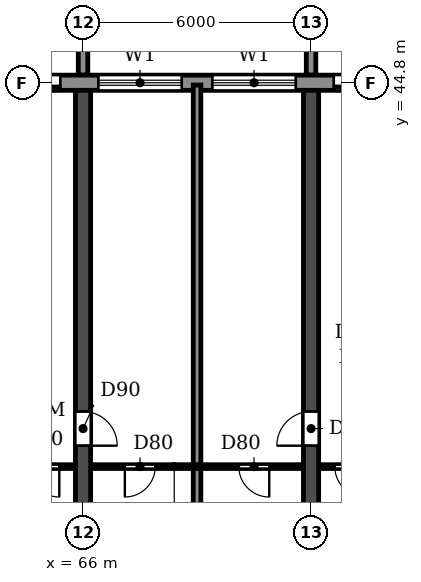
"""IFC4 building model, lengths in metres.
Left out: names, types, materials, properties, quantities, classifications, styles, units other than length and angle.
Written with IfcOpenShell. Run it as: python <this file> out.ifc"""

import sys

from ifc_helpers import new_model, si_unit, direction, frame, frame_2d, origin, place, context, subcontext, project, spatial, polyline, rectangle, outline, extrude, source, transform, mapped, element, fill, save


model = new_model("IFC4")
c1 = context("Model", 3, precision=1e-05, world=origin(), true_north=direction((0.0, 1.0)))
c2 = subcontext(c1, "Body", "Model", "MODEL_VIEW")
j1 = project(units=[si_unit("LENGTHUNIT", "METRE"), si_unit("PLANEANGLEUNIT", "RADIAN")], contexts=[c1])
p1 = place(None, origin())
s1 = spatial("IfcSite", under=j1, at=p1, CompositionType="ELEMENT")
p2 = place(p1, origin())
s2 = spatial("IfcBuilding", under=s1, at=p2, CompositionType="ELEMENT")
p3 = place(p2, frame((0.0, 0.0, 33.3)))
s3 = spatial("IfcBuildingStorey", under=s2, at=p3, CompositionType="ELEMENT", Elevation=33.3)
p4 = place(p3, frame((66.0, 30.55, 0.0), z_axis=(0.0, 0.0, 1.0), x_axis=(0.0, 1.0, 0.0)))
e1 = element("IfcWall", 1, at=p4, inside=s3, PredefinedType="SHEAR", context=c2, shape_type="SweptSolid", body=[
    extrude(rectangle(XDim=14.05, YDim=0.4, at=frame_2d((7.025, 0.0))), origin(), (0.0, 0.0, 1.0), 3.05),
])
p5 = place(p4, frame((4.7, 0.0, 0.0)))
e2 = element("IfcOpeningElement", 2, at=p5, cuts=e1, PredefinedType="OPENING", context=c2, shape_type="SweptSolid", body=[
    extrude(rectangle(XDim=0.9, YDim=2.1, at=frame_2d((0.45, 1.05))), frame((0.0, 0.21, 0.0), z_axis=(0.0, -1.0, 0.0), x_axis=(1.0, 0.0, 0.0)), (0.0, 0.0, 1.0), 0.42),
])
p6 = place(p3, frame((72.0, 30.55, 0.0), z_axis=(0.0, 0.0, 1.0), x_axis=(0.0, 1.0, 0.0)))
e3 = element("IfcWall", 3, at=p6, inside=s3, PredefinedType="SHEAR", context=c2, shape_type="SweptSolid", body=[
    extrude(rectangle(XDim=14.05, YDim=0.4, at=frame_2d((7.025, 0.0))), origin(), (0.0, 0.0, 1.0), 3.05),
])
p7 = place(p6, frame((4.7, 0.0, 0.0)))
e4 = element("IfcOpeningElement", 4, at=p7, cuts=e3, PredefinedType="OPENING", context=c2, shape_type="SweptSolid", body=[
    extrude(rectangle(XDim=0.9, YDim=2.1, at=frame_2d((0.45, 1.05))), frame((0.0, 0.21, 0.0), z_axis=(0.0, -1.0, 0.0), x_axis=(1.0, 0.0, 0.0)), (0.0, 0.0, 1.0), 0.42),
])
p8 = place(p3, frame((97.317, 44.8, 0.0), z_axis=(0.0, 0.0, 1.0), x_axis=(-1.0, 0.0, 0.0)))
e5 = element("IfcWall", 5, at=p8, inside=s3, PredefinedType="STANDARD", context=c2, shape_type="SweptSolid", body=[
    extrude(rectangle(XDim=92.634, YDim=0.4, at=frame_2d((46.317, 0.0))), origin(), (0.0, 0.0, 1.0), 3.05),
])
p9 = place(p8, frame((88.717, 0.0, 0.9)))
e6 = element("IfcOpeningElement", 6, at=p9, cuts=e5, PredefinedType="OPENING", context=c2, shape_type="SweptSolid", body=[
    extrude(rectangle(XDim=2.2, YDim=1.5, at=frame_2d((1.1, 0.75))), frame((0.0, 0.21, 0.0), z_axis=(0.0, -1.0, 0.0), x_axis=(1.0, 0.0, 0.0)), (0.0, 0.0, 1.0), 0.42),
])
p10 = place(p8, frame((85.917, 0.0, 0.0)))
e7 = element("IfcOpeningElement", 7, at=p10, cuts=e5, PredefinedType="OPENING", context=c2, shape_type="SweptSolid", body=[
    extrude(rectangle(XDim=1.8, YDim=2.4, at=frame_2d((0.9, 1.2))), frame((0.0, 0.21, 0.0), z_axis=(0.0, -1.0, 0.0), x_axis=(1.0, 0.0, 0.0)), (0.0, 0.0, 1.0), 0.42),
])
p11 = place(p8, frame((82.717, 0.0, 0.9)))
e8 = element("IfcOpeningElement", 8, at=p11, cuts=e5, PredefinedType="OPENING", context=c2, shape_type="SweptSolid", body=[
    extrude(rectangle(XDim=2.2, YDim=1.5, at=frame_2d((1.1, 0.75))), frame((0.0, 0.21, 0.0), z_axis=(0.0, -1.0, 0.0), x_axis=(1.0, 0.0, 0.0)), (0.0, 0.0, 1.0), 0.42),
])
p12 = place(p8, frame((79.917, 0.0, 0.0)))
e9 = element("IfcOpeningElement", 9, at=p12, cuts=e5, PredefinedType="OPENING", context=c2, shape_type="SweptSolid", body=[
    extrude(rectangle(XDim=1.8, YDim=2.4, at=frame_2d((0.9, 1.2))), frame((0.0, 0.21, 0.0), z_axis=(0.0, -1.0, 0.0), x_axis=(1.0, 0.0, 0.0)), (0.0, 0.0, 1.0), 0.42),
])
p13 = place(p8, frame((76.717, 0.0, 0.9)))
e10 = element("IfcOpeningElement", 10, at=p13, cuts=e5, PredefinedType="OPENING", context=c2, shape_type="SweptSolid", body=[
    extrude(rectangle(XDim=2.2, YDim=1.5, at=frame_2d((1.1, 0.75))), frame((0.0, 0.21, 0.0), z_axis=(0.0, -1.0, 0.0), x_axis=(1.0, 0.0, 0.0)), (0.0, 0.0, 1.0), 0.42),
])
p14 = place(p8, frame((73.717, 0.0, 0.9)))
e11 = element("IfcOpeningElement", 11, at=p14, cuts=e5, PredefinedType="OPENING", context=c2, shape_type="SweptSolid", body=[
    extrude(rectangle(XDim=2.2, YDim=1.5, at=frame_2d((1.1, 0.75))), frame((0.0, 0.21, 0.0), z_axis=(0.0, -1.0, 0.0), x_axis=(1.0, 0.0, 0.0)), (0.0, 0.0, 1.0), 0.42),
])
p15 = place(p8, frame((70.717, 0.0, 0.9)))
e12 = element("IfcOpeningElement", 12, at=p15, cuts=e5, PredefinedType="OPENING", context=c2, shape_type="SweptSolid", body=[
    extrude(rectangle(XDim=2.2, YDim=1.5, at=frame_2d((1.1, 0.75))), frame((0.0, 0.21, 0.0), z_axis=(0.0, -1.0, 0.0), x_axis=(1.0, 0.0, 0.0)), (0.0, 0.0, 1.0), 0.42),
])
p16 = place(p8, frame((67.917, 0.0, 0.0)))
e13 = element("IfcOpeningElement", 13, at=p16, cuts=e5, PredefinedType="OPENING", context=c2, shape_type="SweptSolid", body=[
    extrude(rectangle(XDim=1.8, YDim=2.4, at=frame_2d((0.9, 1.2))), frame((0.0, 0.21, 0.0), z_axis=(0.0, -1.0, 0.0), x_axis=(1.0, 0.0, 0.0)), (0.0, 0.0, 1.0), 0.42),
])
p17 = place(p8, frame((64.717, 0.0, 0.9)))
e14 = element("IfcOpeningElement", 14, at=p17, cuts=e5, PredefinedType="OPENING", context=c2, shape_type="SweptSolid", body=[
    extrude(rectangle(XDim=2.2, YDim=1.5, at=frame_2d((1.1, 0.75))), frame((0.0, 0.21, 0.0), z_axis=(0.0, -1.0, 0.0), x_axis=(1.0, 0.0, 0.0)), (0.0, 0.0, 1.0), 0.42),
])
p18 = place(p8, frame((61.717, 0.0, 0.9)))
e15 = element("IfcOpeningElement", 15, at=p18, cuts=e5, PredefinedType="OPENING", context=c2, shape_type="SweptSolid", body=[
    extrude(rectangle(XDim=2.2, YDim=1.5, at=frame_2d((1.1, 0.75))), frame((0.0, 0.21, 0.0), z_axis=(0.0, -1.0, 0.0), x_axis=(1.0, 0.0, 0.0)), (0.0, 0.0, 1.0), 0.42),
])
p19 = place(p8, frame((58.717, 0.0, 0.9)))
e16 = element("IfcOpeningElement", 16, at=p19, cuts=e5, PredefinedType="OPENING", context=c2, shape_type="SweptSolid", body=[
    extrude(rectangle(XDim=2.2, YDim=1.5, at=frame_2d((1.1, 0.75))), frame((0.0, 0.21, 0.0), z_axis=(0.0, -1.0, 0.0), x_axis=(1.0, 0.0, 0.0)), (0.0, 0.0, 1.0), 0.42),
])
p20 = place(p8, frame((55.917, 0.0, 0.0)))
e17 = element("IfcOpeningElement", 17, at=p20, cuts=e5, PredefinedType="OPENING", context=c2, shape_type="SweptSolid", body=[
    extrude(rectangle(XDim=1.8, YDim=2.4, at=frame_2d((0.9, 1.2))), frame((0.0, 0.21, 0.0), z_axis=(0.0, -1.0, 0.0), x_axis=(1.0, 0.0, 0.0)), (0.0, 0.0, 1.0), 0.42),
])
p21 = place(p8, frame((52.717, 0.0, 0.9)))
e18 = element("IfcOpeningElement", 18, at=p21, cuts=e5, PredefinedType="OPENING", context=c2, shape_type="SweptSolid", body=[
    extrude(rectangle(XDim=2.2, YDim=1.5, at=frame_2d((1.1, 0.75))), frame((0.0, 0.21, 0.0), z_axis=(0.0, -1.0, 0.0), x_axis=(1.0, 0.0, 0.0)), (0.0, 0.0, 1.0), 0.42),
])
p22 = place(p8, frame((49.717, 0.0, 0.9)))
e19 = element("IfcOpeningElement", 19, at=p22, cuts=e5, PredefinedType="OPENING", context=c2, shape_type="SweptSolid", body=[
    extrude(rectangle(XDim=2.2, YDim=1.5, at=frame_2d((1.1, 0.75))), frame((0.0, 0.21, 0.0), z_axis=(0.0, -1.0, 0.0), x_axis=(1.0, 0.0, 0.0)), (0.0, 0.0, 1.0), 0.42),
])
p23 = place(p8, frame((46.717, 0.0, 0.9)))
e20 = element("IfcOpeningElement", 20, at=p23, cuts=e5, PredefinedType="OPENING", context=c2, shape_type="SweptSolid", body=[
    extrude(rectangle(XDim=2.2, YDim=1.5, at=frame_2d((1.1, 0.75))), frame((0.0, 0.21, 0.0), z_axis=(0.0, -1.0, 0.0), x_axis=(1.0, 0.0, 0.0)), (0.0, 0.0, 1.0), 0.42),
])
p24 = place(p8, frame((43.917, 0.0, 0.0)))
e21 = element("IfcOpeningElement", 21, at=p24, cuts=e5, PredefinedType="OPENING", context=c2, shape_type="SweptSolid", body=[
    extrude(rectangle(XDim=1.8, YDim=2.4, at=frame_2d((0.9, 1.2))), frame((0.0, 0.21, 0.0), z_axis=(0.0, -1.0, 0.0), x_axis=(1.0, 0.0, 0.0)), (0.0, 0.0, 1.0), 0.42),
])
p25 = place(p8, frame((40.717, 0.0, 0.9)))
e22 = element("IfcOpeningElement", 22, at=p25, cuts=e5, PredefinedType="OPENING", context=c2, shape_type="SweptSolid", body=[
    extrude(rectangle(XDim=2.2, YDim=1.5, at=frame_2d((1.1, 0.75))), frame((0.0, 0.21, 0.0), z_axis=(0.0, -1.0, 0.0), x_axis=(1.0, 0.0, 0.0)), (0.0, 0.0, 1.0), 0.42),
])
p26 = place(p8, frame((37.717, 0.0, 0.9)))
e23 = element("IfcOpeningElement", 23, at=p26, cuts=e5, PredefinedType="OPENING", context=c2, shape_type="SweptSolid", body=[
    extrude(rectangle(XDim=2.2, YDim=1.5, at=frame_2d((1.1, 0.75))), frame((0.0, 0.21, 0.0), z_axis=(0.0, -1.0, 0.0), x_axis=(1.0, 0.0, 0.0)), (0.0, 0.0, 1.0), 0.42),
])
p27 = place(p8, frame((34.717, 0.0, 0.9)))
e24 = element("IfcOpeningElement", 24, at=p27, cuts=e5, PredefinedType="OPENING", context=c2, shape_type="SweptSolid", body=[
    extrude(rectangle(XDim=2.2, YDim=1.5, at=frame_2d((1.1, 0.75))), frame((0.0, 0.21, 0.0), z_axis=(0.0, -1.0, 0.0), x_axis=(1.0, 0.0, 0.0)), (0.0, 0.0, 1.0), 0.42),
])
p28 = place(p8, frame((31.917, 0.0, 0.0)))
e25 = element("IfcOpeningElement", 25, at=p28, cuts=e5, PredefinedType="OPENING", context=c2, shape_type="SweptSolid", body=[
    extrude(rectangle(XDim=1.8, YDim=2.4, at=frame_2d((0.9, 1.2))), frame((0.0, 0.21, 0.0), z_axis=(0.0, -1.0, 0.0), x_axis=(1.0, 0.0, 0.0)), (0.0, 0.0, 1.0), 0.42),
])
p29 = place(p8, frame((28.717, 0.0, 0.9)))
e26 = element("IfcOpeningElement", 26, at=p29, cuts=e5, PredefinedType="OPENING", context=c2, shape_type="SweptSolid", body=[
    extrude(rectangle(XDim=2.2, YDim=1.5, at=frame_2d((1.1, 0.75))), frame((0.0, 0.21, 0.0), z_axis=(0.0, -1.0, 0.0), x_axis=(1.0, 0.0, 0.0)), (0.0, 0.0, 1.0), 0.42),
])
p30 = place(p8, frame((25.717, 0.0, 0.9)))
e27 = element("IfcOpeningElement", 27, at=p30, cuts=e5, PredefinedType="OPENING", context=c2, shape_type="SweptSolid", body=[
    extrude(rectangle(XDim=2.2, YDim=1.5, at=frame_2d((1.1, 0.75))), frame((0.0, 0.21, 0.0), z_axis=(0.0, -1.0, 0.0), x_axis=(1.0, 0.0, 0.0)), (0.0, 0.0, 1.0), 0.42),
])
p31 = place(p8, frame((22.917, 0.0, 0.0)))
e28 = element("IfcOpeningElement", 28, at=p31, cuts=e5, PredefinedType="OPENING", context=c2, shape_type="SweptSolid", body=[
    extrude(rectangle(XDim=1.8, YDim=2.4, at=frame_2d((0.9, 1.2))), frame((0.0, 0.21, 0.0), z_axis=(0.0, -1.0, 0.0), x_axis=(1.0, 0.0, 0.0)), (0.0, 0.0, 1.0), 0.42),
])
p32 = place(p8, frame((19.717, 0.0, 0.9)))
e29 = element("IfcOpeningElement", 29, at=p32, cuts=e5, PredefinedType="OPENING", context=c2, shape_type="SweptSolid", body=[
    extrude(rectangle(XDim=2.2, YDim=1.5, at=frame_2d((1.1, 0.75))), frame((0.0, 0.21, 0.0), z_axis=(0.0, -1.0, 0.0), x_axis=(1.0, 0.0, 0.0)), (0.0, 0.0, 1.0), 0.42),
])
p33 = place(p8, frame((16.717, 0.0, 0.9)))
e30 = element("IfcOpeningElement", 30, at=p33, cuts=e5, PredefinedType="OPENING", context=c2, shape_type="SweptSolid", body=[
    extrude(rectangle(XDim=2.2, YDim=1.5, at=frame_2d((1.1, 0.75))), frame((0.0, 0.21, 0.0), z_axis=(0.0, -1.0, 0.0), x_axis=(1.0, 0.0, 0.0)), (0.0, 0.0, 1.0), 0.42),
])
p34 = place(p8, frame((13.917, 0.0, 0.0)))
e31 = element("IfcOpeningElement", 31, at=p34, cuts=e5, PredefinedType="OPENING", context=c2, shape_type="SweptSolid", body=[
    extrude(rectangle(XDim=1.8, YDim=2.4, at=frame_2d((0.9, 1.2))), frame((0.0, 0.21, 0.0), z_axis=(0.0, -1.0, 0.0), x_axis=(1.0, 0.0, 0.0)), (0.0, 0.0, 1.0), 0.42),
])
p35 = place(p8, frame((10.717, 0.0, 0.9)))
e32 = element("IfcOpeningElement", 32, at=p35, cuts=e5, PredefinedType="OPENING", context=c2, shape_type="SweptSolid", body=[
    extrude(rectangle(XDim=2.2, YDim=1.5, at=frame_2d((1.1, 0.75))), frame((0.0, 0.21, 0.0), z_axis=(0.0, -1.0, 0.0), x_axis=(1.0, 0.0, 0.0)), (0.0, 0.0, 1.0), 0.42),
])
p36 = place(p8, frame((7.917, 0.0, 0.0)))
e33 = element("IfcOpeningElement", 33, at=p36, cuts=e5, PredefinedType="OPENING", context=c2, shape_type="SweptSolid", body=[
    extrude(rectangle(XDim=1.8, YDim=2.4, at=frame_2d((0.9, 1.2))), frame((0.0, 0.21, 0.0), z_axis=(0.0, -1.0, 0.0), x_axis=(1.0, 0.0, 0.0)), (0.0, 0.0, 1.0), 0.42),
])
p37 = place(p8, frame((4.717, 0.0, 0.9)))
e34 = element("IfcOpeningElement", 34, at=p37, cuts=e5, PredefinedType="OPENING", context=c2, shape_type="SweptSolid", body=[
    extrude(rectangle(XDim=2.2, YDim=1.5, at=frame_2d((1.1, 0.75))), frame((0.0, 0.21, 0.0), z_axis=(0.0, -1.0, 0.0), x_axis=(1.0, 0.0, 0.0)), (0.0, 0.0, 1.0), 0.42),
])
p38 = place(p8, frame((1.917, 0.0, 0.0)))
e35 = element("IfcOpeningElement", 35, at=p38, cuts=e5, PredefinedType="OPENING", context=c2, shape_type="SweptSolid", body=[
    extrude(rectangle(XDim=1.8, YDim=2.4, at=frame_2d((0.9, 1.2))), frame((0.0, 0.21, 0.0), z_axis=(0.0, -1.0, 0.0), x_axis=(1.0, 0.0, 0.0)), (0.0, 0.0, 1.0), 0.42),
])
m1 = source(origin(), c2, "Body", "SweptSolid", [
    extrude(outline(polyline([(0.0, 0.0), (0.25, 0.0), (0.25, 3.1), (0.0, 3.1), (0.0, 0.0)])), origin(), (0.0, 0.0, 1.0), 3.1),
])
for number, where in (
    (36, (65.875, 45.0, 0.0)),
    (37, (71.875, 45.0, 0.0)),
):
    element("IfcWall", number, at=place(p3, frame(where)), inside=s3, PredefinedType="STANDARD", context=c2, shape_type="MappedRepresentation", body=[
        mapped(m1, transform((0.0, 0.0, 0.0))),
    ])
p39 = place(p3, frame((69.0, 30.56, 0.0), z_axis=(0.0, 0.0, 1.0), x_axis=(0.0, 1.0, 0.0)))
e38 = element("IfcWall", 38, at=p39, inside=s3, PredefinedType="PARTITIONING", context=c2, shape_type="SweptSolid", body=[
    extrude(rectangle(XDim=14.18, YDim=0.2, at=frame_2d((7.09, 0.0))), origin(), (0.0, 0.0, 1.0), 3.05),
])
p40 = place(p3, frame((63.9, 34.7, 0.0), z_axis=(0.0, 0.0, 1.0), x_axis=(1.0, 0.0, 0.0)))
e39 = element("IfcWall", 39, at=p40, inside=s3, PredefinedType="PARTITIONING", context=c2, shape_type="SweptSolid", body=[
    extrude(rectangle(XDim=1.89, YDim=0.1, at=frame_2d((0.945, 0.0))), origin(), (0.0, 0.0, 1.0), 3.05),
])
p41 = place(p40, frame((0.675, 0.0, 0.0)))
e40 = element("IfcOpeningElement", 40, at=p41, cuts=e39, PredefinedType="OPENING", context=c2, shape_type="SweptSolid", body=[
    extrude(rectangle(XDim=0.8, YDim=2.1, at=frame_2d((0.4, 1.05))), frame((0.0, 0.06, 0.0), z_axis=(0.0, -1.0, 0.0), x_axis=(1.0, 0.0, 0.0)), (0.0, 0.0, 1.0), 0.12),
])
p42 = place(p3, frame((66.21, 34.7, 0.0), z_axis=(0.0, 0.0, 1.0), x_axis=(1.0, 0.0, 0.0)))
e41 = element("IfcWall", 41, at=p42, inside=s3, PredefinedType="PARTITIONING", context=c2, shape_type="SweptSolid", body=[
    extrude(rectangle(XDim=5.58, YDim=0.1, at=frame_2d((2.79, 0.0))), origin(), (0.0, 0.0, 1.0), 3.05),
])
p43 = place(p42, frame((0.89, 0.0, 0.0)))
e42 = element("IfcOpeningElement", 42, at=p43, cuts=e41, PredefinedType="OPENING", context=c2, shape_type="SweptSolid", body=[
    extrude(rectangle(XDim=0.8, YDim=2.1, at=frame_2d((0.4, 1.05))), frame((0.0, 0.06, 0.0), z_axis=(0.0, -1.0, 0.0), x_axis=(1.0, 0.0, 0.0)), (0.0, 0.0, 1.0), 0.12),
])
p44 = place(p42, frame((3.89, 0.0, 0.0)))
e43 = element("IfcOpeningElement", 43, at=p44, cuts=e41, PredefinedType="OPENING", context=c2, shape_type="SweptSolid", body=[
    extrude(rectangle(XDim=0.8, YDim=2.1, at=frame_2d((0.4, 1.05))), frame((0.0, 0.06, 0.0), z_axis=(0.0, -1.0, 0.0), x_axis=(1.0, 0.0, 0.0)), (0.0, 0.0, 1.0), 0.12),
])
p45 = place(p3, frame((72.21, 34.7, 0.0), z_axis=(0.0, 0.0, 1.0), x_axis=(1.0, 0.0, 0.0)))
e44 = element("IfcWall", 44, at=p45, inside=s3, PredefinedType="PARTITIONING", context=c2, shape_type="SweptSolid", body=[
    extrude(rectangle(XDim=1.89, YDim=0.1, at=frame_2d((0.945, 0.0))), origin(), (0.0, 0.0, 1.0), 3.05),
])
p46 = place(p45, frame((0.415, 0.0, 0.0)))
e45 = element("IfcOpeningElement", 45, at=p46, cuts=e44, PredefinedType="OPENING", context=c2, shape_type="SweptSolid", body=[
    extrude(rectangle(XDim=0.8, YDim=2.1, at=frame_2d((0.4, 1.05))), frame((0.0, 0.06, 0.0), z_axis=(0.0, -1.0, 0.0), x_axis=(1.0, 0.0, 0.0)), (0.0, 0.0, 1.0), 0.12),
])
p47 = place(p28, origin())
e46 = element("IfcDoor", 46, at=p47, inside=s3, OperationType="DOUBLE_DOOR_SLIDING", PredefinedType="DOOR", context=c2, shape_type="SweptSolid", body=[
    extrude(rectangle(XDim=1.8, YDim=2.4, at=frame_2d((0.9, 1.2))), frame((0.0, 0.025, 0.0), z_axis=(0.0, -1.0, 0.0), x_axis=(1.0, 0.0, 0.0)), (0.0, 0.0, 1.0), 0.05),
])
fill(e25, e46)
p48 = place(p29, origin())
e47 = element("IfcWindow", 47, at=p48, inside=s3, PartitioningType="DOUBLE_PANEL_HORIZONTAL", PredefinedType="WINDOW", context=c2, shape_type="SweptSolid", body=[
    extrude(rectangle(XDim=2.2, YDim=1.5, at=frame_2d((1.1, 0.75))), frame((0.0, 0.03, 0.0), z_axis=(0.0, -1.0, 0.0), x_axis=(1.0, 0.0, 0.0)), (0.0, 0.0, 1.0), 0.06),
])
fill(e26, e47)
p49 = place(p30, origin())
e48 = element("IfcWindow", 48, at=p49, inside=s3, PartitioningType="DOUBLE_PANEL_HORIZONTAL", PredefinedType="WINDOW", context=c2, shape_type="SweptSolid", body=[
    extrude(rectangle(XDim=2.2, YDim=1.5, at=frame_2d((1.1, 0.75))), frame((0.0, 0.03, 0.0), z_axis=(0.0, -1.0, 0.0), x_axis=(1.0, 0.0, 0.0)), (0.0, 0.0, 1.0), 0.06),
])
fill(e27, e48)
p50 = place(p31, origin())
e49 = element("IfcDoor", 49, at=p50, inside=s3, OperationType="DOUBLE_DOOR_SLIDING", PredefinedType="DOOR", context=c2, shape_type="SweptSolid", body=[
    extrude(rectangle(XDim=1.8, YDim=2.4, at=frame_2d((0.9, 1.2))), frame((0.0, 0.025, 0.0), z_axis=(0.0, -1.0, 0.0), x_axis=(1.0, 0.0, 0.0)), (0.0, 0.0, 1.0), 0.05),
])
fill(e28, e49)
p51 = place(p43, frame((0.8, 0.0, 0.0), z_axis=(0.0, 0.0, 1.0), x_axis=(-1.0, 0.0, 0.0)))
e50 = element("IfcDoor", 50, at=p51, inside=s3, OperationType="SINGLE_SWING_RIGHT", PredefinedType="DOOR", context=c2, shape_type="SweptSolid", body=[
    extrude(rectangle(XDim=0.8, YDim=2.1, at=frame_2d((0.4, 1.05))), frame((0.0, 0.025, 0.0), z_axis=(0.0, -1.0, 0.0), x_axis=(1.0, 0.0, 0.0)), (0.0, 0.0, 1.0), 0.05),
])
fill(e42, e50)
p52 = place(p41, frame((0.8, 0.0, 0.0), z_axis=(0.0, 0.0, 1.0), x_axis=(-1.0, 0.0, 0.0)))
e51 = element("IfcDoor", 51, at=p52, inside=s3, OperationType="SINGLE_SWING_LEFT", PredefinedType="DOOR", context=c2, shape_type="SweptSolid", body=[
    extrude(rectangle(XDim=0.8, YDim=2.1, at=frame_2d((0.4, 1.05))), frame((0.0, 0.025, 0.0), z_axis=(0.0, -1.0, 0.0), x_axis=(1.0, 0.0, 0.0)), (0.0, 0.0, 1.0), 0.05),
])
fill(e40, e51)
p53 = place(p5, frame((0.9, 0.0, 0.0), z_axis=(0.0, 0.0, 1.0), x_axis=(-1.0, 0.0, 0.0)))
e52 = element("IfcDoor", 52, at=p53, inside=s3, OperationType="SINGLE_SWING_RIGHT", PredefinedType="DOOR", context=c2, shape_type="SweptSolid", body=[
    extrude(rectangle(XDim=0.9, YDim=2.1, at=frame_2d((0.45, 1.05))), frame((0.0, 0.025, 0.0), z_axis=(0.0, -1.0, 0.0), x_axis=(1.0, 0.0, 0.0)), (0.0, 0.0, 1.0), 0.05),
])
fill(e2, e52)
p54 = place(p44, frame((0.8, 0.0, 0.0), z_axis=(0.0, 0.0, 1.0), x_axis=(-1.0, 0.0, 0.0)))
e53 = element("IfcDoor", 53, at=p54, inside=s3, OperationType="SINGLE_SWING_LEFT", PredefinedType="DOOR", context=c2, shape_type="SweptSolid", body=[
    extrude(rectangle(XDim=0.8, YDim=2.1, at=frame_2d((0.4, 1.05))), frame((0.0, 0.025, 0.0), z_axis=(0.0, -1.0, 0.0), x_axis=(1.0, 0.0, 0.0)), (0.0, 0.0, 1.0), 0.05),
])
fill(e43, e53)
p55 = place(p7, origin())
e54 = element("IfcDoor", 54, at=p55, inside=s3, OperationType="SINGLE_SWING_LEFT", PredefinedType="DOOR", context=c2, shape_type="SweptSolid", body=[
    extrude(rectangle(XDim=0.9, YDim=2.1, at=frame_2d((0.45, 1.05))), frame((0.0, 0.025, 0.0), z_axis=(0.0, -1.0, 0.0), x_axis=(1.0, 0.0, 0.0)), (0.0, 0.0, 1.0), 0.05),
])
fill(e4, e54)
p56 = place(p46, frame((0.8, 0.0, 0.0), z_axis=(0.0, 0.0, 1.0), x_axis=(-1.0, 0.0, 0.0)))
e55 = element("IfcDoor", 55, at=p56, inside=s3, OperationType="SINGLE_SWING_LEFT", PredefinedType="DOOR", context=c2, shape_type="SweptSolid", body=[
    extrude(rectangle(XDim=0.8, YDim=2.1, at=frame_2d((0.4, 1.05))), frame((0.0, 0.025, 0.0), z_axis=(0.0, -1.0, 0.0), x_axis=(1.0, 0.0, 0.0)), (0.0, 0.0, 1.0), 0.05),
])
fill(e45, e55)
save(model, sys.argv[1])
